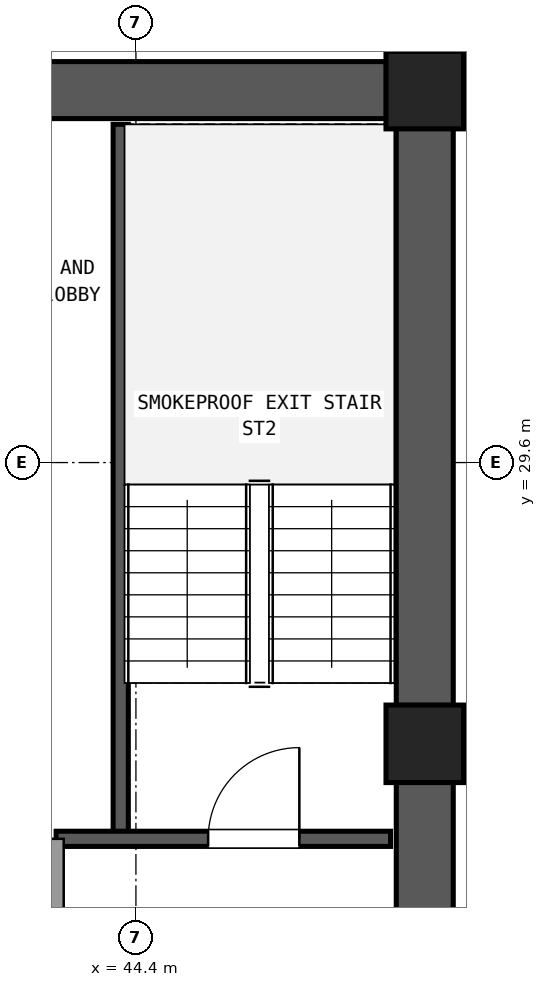
"""IFC4 building model, lengths in metres.
Left out: names, types, materials, properties, quantities, classifications, styles, units other than length and angle.
Written with IfcOpenShell. Run it as: python <this file> out.ifc"""

import sys

from ifc_helpers import new_model, si_unit, direction, frame, frame_2d, origin, origin_2d, place, context, subcontext, project, spatial, rectangle, extrude, element, fill, save


model = new_model("IFC4")
c1 = context("Model", 3, precision=1e-05, world=origin(), true_north=direction((0.0, 1.0)))
c2 = subcontext(c1, "Body", "Model", "MODEL_VIEW")
j1 = project(units=[si_unit("LENGTHUNIT", "METRE"), si_unit("PLANEANGLEUNIT", "RADIAN")], contexts=[c1])
p1 = place(None, origin())
s1 = spatial("IfcSite", under=j1, at=p1, CompositionType="ELEMENT")
p2 = place(p1, origin())
s2 = spatial("IfcBuilding", under=s1, at=p2, CompositionType="ELEMENT")
p3 = place(p2, frame((0.0, 0.0, 163.62)))
s3 = spatial("IfcBuildingStorey", under=s2, at=p3, CompositionType="ELEMENT", Elevation=163.62)
for number, where, z_axis, x_axis in (
    (1, (48.2, 25.9, 0.0), (0.0, 0.0, 1.0), (1.0, 0.0, 0.0)),
    (2, (48.2, 34.5, 0.0), (0.0, 0.0, 1.0), (1.0, 0.0, 0.0)),
):
    element("IfcColumn", number, at=place(p3, frame(where, z_axis=z_axis, x_axis=x_axis)), inside=s3, PredefinedType="COLUMN", context=c2, shape_type="SweptSolid", body=[
        extrude(rectangle(XDim=1.02, YDim=1.02, at=origin_2d()), origin(), (0.0, 0.0, 1.0), 3.6),
    ])
p4 = place(p3, frame((48.2, 17.805, 0.0), z_axis=(0.0, 0.0, 1.0), x_axis=(0.0, 1.0, 0.0)))
e3 = element("IfcWall", 3, at=p4, inside=s3, PredefinedType="SHEAR", context=c2, shape_type="SweptSolid", body=[
    extrude(rectangle(XDim=7.59, YDim=0.75, at=frame_2d((3.795, 0.0))), origin(), (0.0, 0.0, 1.0), 3.32),
])
p5 = place(p4, frame((4.245, 0.0, 0.0)))
e4 = element("IfcOpeningElement", 4, at=p5, cuts=e3, PredefinedType="OPENING", context=c2, shape_type="SweptSolid", body=[
    extrude(rectangle(XDim=1.2, YDim=2.15, at=frame_2d((0.6, 1.075))), frame((0.0, 0.385, 0.0), z_axis=(0.0, -1.0, 0.0), x_axis=(1.0, 0.0, 0.0)), (0.0, 0.0, 1.0), 0.77),
])
p6 = place(p3, frame((48.2, 26.405, 0.0), z_axis=(0.0, 0.0, 1.0), x_axis=(0.0, 1.0, 0.0)))
e5 = element("IfcWall", 5, at=p6, inside=s3, PredefinedType="SHEAR", context=c2, shape_type="SweptSolid", body=[
    extrude(rectangle(XDim=7.59, YDim=0.75, at=frame_2d((3.795, 0.0))), origin(), (0.0, 0.0, 1.0), 3.32),
])
p7 = place(p3, frame((47.695, 34.5, 0.0), z_axis=(0.0, 0.0, 1.0), x_axis=(-1.0, 0.0, 0.0)))
e6 = element("IfcWall", 6, at=p7, inside=s3, PredefinedType="SHEAR", context=c2, shape_type="SweptSolid", body=[
    extrude(rectangle(XDim=10.19, YDim=0.75, at=frame_2d((5.095, 0.0))), origin(), (0.0, 0.0, 1.0), 3.32),
])
p8 = place(p7, frame((4.595, 0.0, 0.0)))
e7 = element("IfcOpeningElement", 7, at=p8, cuts=e6, PredefinedType="OPENING", context=c2, shape_type="SweptSolid", body=[
    extrude(rectangle(XDim=1.6, YDim=2.2, at=frame_2d((0.8, 1.1))), frame((0.0, 0.385, 0.0), z_axis=(0.0, -1.0, 0.0), x_axis=(1.0, 0.0, 0.0)), (0.0, 0.0, 1.0), 0.77),
])
p9 = place(p3, frame((44.2, 24.65, 0.0), z_axis=(0.0, 0.0, 1.0), x_axis=(0.0, 1.0, 0.0)))
e8 = element("IfcWall", 8, at=p9, inside=s3, PredefinedType="SHEAR", context=c2, shape_type="SweptSolid", body=[
    extrude(rectangle(XDim=9.4, YDim=0.2, at=frame_2d((4.7, 0.0))), origin(), (0.0, 0.0, 1.0), 3.32),
])
p10 = place(p3, frame((43.35, 24.65, 0.0), z_axis=(0.0, 0.0, 1.0), x_axis=(1.0, 0.0, 0.0)))
e9 = element("IfcWall", 9, at=p10, inside=s3, PredefinedType="SHEAR", context=c2, shape_type="SweptSolid", body=[
    extrude(rectangle(XDim=4.4, YDim=0.2, at=frame_2d((2.2, 0.0))), origin(), (0.0, 0.0, 1.0), 3.32),
])
p11 = place(p10, frame((2.0, 0.0, 0.0)))
e10 = element("IfcOpeningElement", 10, at=p11, cuts=e9, PredefinedType="OPENING", context=c2, shape_type="SweptSolid", body=[
    extrude(rectangle(XDim=1.2, YDim=2.15, at=frame_2d((0.6, 1.075))), frame((0.0, 0.11, 0.0), z_axis=(0.0, -1.0, 0.0), x_axis=(1.0, 0.0, 0.0)), (0.0, 0.0, 1.0), 0.22),
])
p12 = place(p3, frame((43.35, 17.75, 0.0), z_axis=(0.0, 0.0, 1.0), x_axis=(0.0, 1.0, 0.0)))
e11 = element("IfcWall", 11, at=p12, inside=s3, PredefinedType="SOLIDWALL", context=c2, shape_type="SweptSolid", body=[
    extrude(rectangle(XDim=6.9, YDim=0.2, at=frame_2d((3.45, 0.0))), origin(), (0.0, 0.0, 1.0), 2.61),
])
p13 = place(p12, frame((4.15, 0.0, 0.0)))
e12 = element("IfcOpeningElement", 12, at=p13, cuts=e11, PredefinedType="OPENING", context=c2, shape_type="SweptSolid", body=[
    extrude(rectangle(XDim=1.2, YDim=2.15, at=frame_2d((0.6, 1.075))), frame((0.0, 0.11, 0.0), z_axis=(0.0, -1.0, 0.0), x_axis=(1.0, 0.0, 0.0)), (0.0, 0.0, 1.0), 0.22),
])
p14 = place(p11, origin())
e13 = element("IfcDoor", 13, at=p14, inside=s3, OperationType="SINGLE_SWING_RIGHT", PredefinedType="DOOR", context=c2, shape_type="SweptSolid", body=[
    extrude(rectangle(XDim=1.2, YDim=2.15, at=frame_2d((0.6, 1.075))), frame((0.0, 0.025, 0.0), z_axis=(0.0, -1.0, 0.0), x_axis=(1.0, 0.0, 0.0)), (0.0, 0.0, 1.0), 0.05),
])
fill(e10, e13)
save(model, sys.argv[1])
